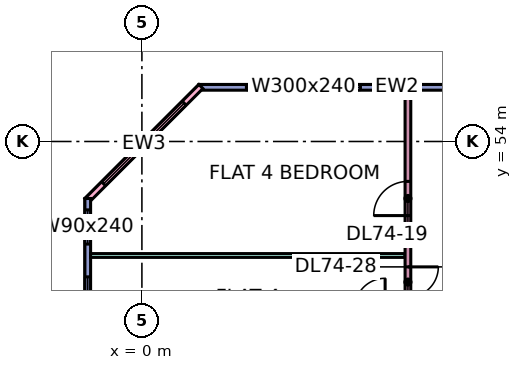
"""IFC4 building model, lengths in metres.
Left out: names, types, materials, properties, quantities, classifications, styles, units other than length and angle.
Written with IfcOpenShell. Run it as: python <this file> out.ifc"""

import sys

from ifc_helpers import new_model, si_unit, direction, frame, frame_2d, origin, place, context, subcontext, project, spatial, rectangle, extrude, element, fill, save


model = new_model("IFC4")
c1 = context("Model", 3, precision=1e-05, world=origin(), true_north=direction((0.0, 1.0)))
c2 = subcontext(c1, "Body", "Model", "MODEL_VIEW")
j1 = project(units=[si_unit("LENGTHUNIT", "METRE"), si_unit("PLANEANGLEUNIT", "RADIAN")], contexts=[c1])
p1 = place(None, origin())
s1 = spatial("IfcSite", under=j1, at=p1, CompositionType="ELEMENT")
p2 = place(p1, origin())
s2 = spatial("IfcBuilding", under=s1, at=p2, CompositionType="ELEMENT")
p3 = place(p2, frame((0.0, 0.0, 314.65)))
s3 = spatial("IfcBuildingStorey", under=s2, at=p3, CompositionType="ELEMENT", Elevation=314.65)
p4 = place(p3, frame((11.925, 55.425, 0.0), z_axis=(0.0, 0.0, 1.0), x_axis=(-1.0, 0.0, 0.0)))
e1 = element("IfcWall", 1, at=p4, inside=s3, PredefinedType="SOLIDWALL", context=c2, shape_type="SweptSolid", body=[
    extrude(rectangle(XDim=10.425, YDim=0.15, at=frame_2d((5.212, 0.0))), origin(), (0.0, 0.0, 1.0), 3.35),
])
p5 = place(p4, frame((0.962, 0.0, 0.45)))
e2 = element("IfcOpeningElement", 2, at=p5, cuts=e1, PredefinedType="OPENING", context=c2, shape_type="SweptSolid", body=[
    extrude(rectangle(XDim=3.0, YDim=2.4, at=frame_2d((1.5, 1.2))), frame((0.0, 0.085, 0.0), z_axis=(0.0, -1.0, 0.0), x_axis=(1.0, 0.0, 0.0)), (0.0, 0.0, 1.0), 0.17),
])
p6 = place(p4, frame((6.175, 0.0, 0.45)))
e3 = element("IfcOpeningElement", 3, at=p6, cuts=e1, PredefinedType="OPENING", context=c2, shape_type="SweptSolid", body=[
    extrude(rectangle(XDim=3.0, YDim=2.4, at=frame_2d((1.5, 1.2))), frame((0.0, 0.085, 0.0), z_axis=(0.0, -1.0, 0.0), x_axis=(1.0, 0.0, 0.0)), (0.0, 0.0, 1.0), 0.17),
])
p7 = place(p3, frame((1.553, 55.447, 0.0), z_axis=(0.0, 0.0, 1.0), x_axis=(-0.707106781187, -0.707106781187, 0.0)))
e4 = element("IfcWall", 4, at=p7, inside=s3, PredefinedType="SOLIDWALL", context=c2, shape_type="SweptSolid", body=[
    extrude(rectangle(XDim=4.243, YDim=0.15, at=frame_2d((2.121, 0.0))), origin(), (0.0, 0.0, 1.0), 3.35),
])
p8 = place(p7, frame((0.621, 0.0, 0.45)))
e5 = element("IfcOpeningElement", 5, at=p8, cuts=e4, PredefinedType="OPENING", context=c2, shape_type="SweptSolid", body=[
    extrude(rectangle(XDim=3.0, YDim=2.4, at=frame_2d((1.5, 1.2))), frame((0.0, 0.085, 0.0), z_axis=(0.0, -1.0, 0.0), x_axis=(1.0, 0.0, 0.0)), (0.0, 0.0, 1.0), 0.17),
])
p9 = place(p3, frame((-1.425, 52.5, 0.0), z_axis=(0.0, 0.0, 1.0), x_axis=(0.0, -1.0, 0.0)))
e6 = element("IfcWall", 6, at=p9, inside=s3, PredefinedType="SOLIDWALL", context=c2, shape_type="SweptSolid", body=[
    extrude(rectangle(XDim=4.425, YDim=0.15, at=frame_2d((2.212, 0.0))), origin(), (0.0, 0.0, 1.0), 3.35),
])
p10 = place(p9, frame((0.3, 0.0, 0.45)))
e7 = element("IfcOpeningElement", 7, at=p10, cuts=e6, PredefinedType="OPENING", context=c2, shape_type="SweptSolid", body=[
    extrude(rectangle(XDim=0.9, YDim=2.4, at=frame_2d((0.45, 1.2))), frame((0.0, 0.085, 0.0), z_axis=(0.0, -1.0, 0.0), x_axis=(1.0, 0.0, 0.0)), (0.0, 0.0, 1.0), 0.17),
])
p11 = place(p9, frame((2.062, 0.0, 0.45)))
e8 = element("IfcOpeningElement", 8, at=p11, cuts=e6, PredefinedType="OPENING", context=c2, shape_type="SweptSolid", body=[
    extrude(rectangle(XDim=1.8, YDim=2.4, at=frame_2d((0.9, 1.2))), frame((0.0, 0.085, 0.0), z_axis=(0.0, -1.0, 0.0), x_axis=(1.0, 0.0, 0.0)), (0.0, 0.0, 1.0), 0.17),
])
p12 = place(p3, frame((-1.351, 51.0, 0.0), z_axis=(0.0, 0.0, 1.0), x_axis=(1.0, 0.0, 0.0)))
e9 = element("IfcWall", 9, at=p12, inside=s3, PredefinedType="PARTITIONING", context=c2, shape_type="SweptSolid", body=[
    extrude(rectangle(XDim=8.276, YDim=0.1, at=frame_2d((4.138, 0.0))), origin(), (0.0, 0.0, 1.0), 3.35),
])
p13 = place(p3, frame((7.0, 48.075, 0.0), z_axis=(0.0, 0.0, 1.0), x_axis=(0.0, 1.0, 0.0)))
e10 = element("IfcWall", 10, at=p13, inside=s3, PredefinedType="PARTITIONING", context=c2, shape_type="SweptSolid", body=[
    extrude(rectangle(XDim=7.275, YDim=0.15, at=frame_2d((3.638, 0.0))), origin(), (0.0, 0.0, 1.0), 3.35),
])
p14 = place(p13, frame((3.975, 0.0, 0.0)))
e11 = element("IfcOpeningElement", 11, at=p14, cuts=e10, PredefinedType="OPENING", context=c2, shape_type="SweptSolid", body=[
    extrude(rectangle(XDim=0.9, YDim=2.1, at=frame_2d((0.45, 1.05))), frame((0.0, 0.085, 0.0), z_axis=(0.0, -1.0, 0.0), x_axis=(1.0, 0.0, 0.0)), (0.0, 0.0, 1.0), 0.17),
])
p15 = place(p13, frame((1.825, 0.0, 0.0)))
e12 = element("IfcOpeningElement", 12, at=p15, cuts=e10, PredefinedType="OPENING", context=c2, shape_type="SweptSolid", body=[
    extrude(rectangle(XDim=0.8, YDim=2.1, at=frame_2d((0.4, 1.05))), frame((0.0, 0.085, 0.0), z_axis=(0.0, -1.0, 0.0), x_axis=(1.0, 0.0, 0.0)), (0.0, 0.0, 1.0), 0.17),
])
p16 = place(p6, origin())
e13 = element("IfcWindow", 13, at=p16, inside=s3, PartitioningType="SINGLE_PANEL", PredefinedType="WINDOW", context=c2, shape_type="SweptSolid", body=[
    extrude(rectangle(XDim=3.0, YDim=2.4, at=frame_2d((1.5, 1.2))), frame((0.0, 0.03, 0.0), z_axis=(0.0, -1.0, 0.0), x_axis=(1.0, 0.0, 0.0)), (0.0, 0.0, 1.0), 0.06),
])
fill(e3, e13)
p17 = place(p8, origin())
e14 = element("IfcWindow", 14, at=p17, inside=s3, PartitioningType="SINGLE_PANEL", PredefinedType="WINDOW", context=c2, shape_type="SweptSolid", body=[
    extrude(rectangle(XDim=3.0, YDim=2.4, at=frame_2d((1.5, 1.2))), frame((0.0, 0.03, 0.0), z_axis=(0.0, -1.0, 0.0), x_axis=(1.0, 0.0, 0.0)), (0.0, 0.0, 1.0), 0.06),
])
fill(e5, e14)
p18 = place(p10, origin())
e15 = element("IfcWindow", 15, at=p18, inside=s3, PartitioningType="SINGLE_PANEL", PredefinedType="WINDOW", context=c2, shape_type="SweptSolid", body=[
    extrude(rectangle(XDim=0.9, YDim=2.4, at=frame_2d((0.45, 1.2))), frame((0.0, 0.03, 0.0), z_axis=(0.0, -1.0, 0.0), x_axis=(1.0, 0.0, 0.0)), (0.0, 0.0, 1.0), 0.06),
])
fill(e7, e15)
p19 = place(p11, origin())
e16 = element("IfcWindow", 16, at=p19, inside=s3, PartitioningType="SINGLE_PANEL", PredefinedType="WINDOW", context=c2, shape_type="SweptSolid", body=[
    extrude(rectangle(XDim=1.8, YDim=2.4, at=frame_2d((0.9, 1.2))), frame((0.0, 0.03, 0.0), z_axis=(0.0, -1.0, 0.0), x_axis=(1.0, 0.0, 0.0)), (0.0, 0.0, 1.0), 0.06),
])
fill(e8, e16)
p20 = place(p14, origin())
e17 = element("IfcDoor", 17, at=p20, inside=s3, OperationType="SINGLE_SWING_LEFT", PredefinedType="DOOR", context=c2, shape_type="SweptSolid", body=[
    extrude(rectangle(XDim=0.9, YDim=2.1, at=frame_2d((0.45, 1.05))), frame((0.0, 0.025, 0.0), z_axis=(0.0, -1.0, 0.0), x_axis=(1.0, 0.0, 0.0)), (0.0, 0.0, 1.0), 0.05),
])
fill(e11, e17)
p21 = place(p15, origin())
e18 = element("IfcDoor", 18, at=p21, inside=s3, OperationType="SINGLE_SWING_RIGHT", PredefinedType="DOOR", context=c2, shape_type="SweptSolid", body=[
    extrude(rectangle(XDim=0.8, YDim=2.1, at=frame_2d((0.4, 1.05))), frame((0.0, 0.025, 0.0), z_axis=(0.0, -1.0, 0.0), x_axis=(1.0, 0.0, 0.0)), (0.0, 0.0, 1.0), 0.05),
])
fill(e12, e18)
save(model, sys.argv[1])
